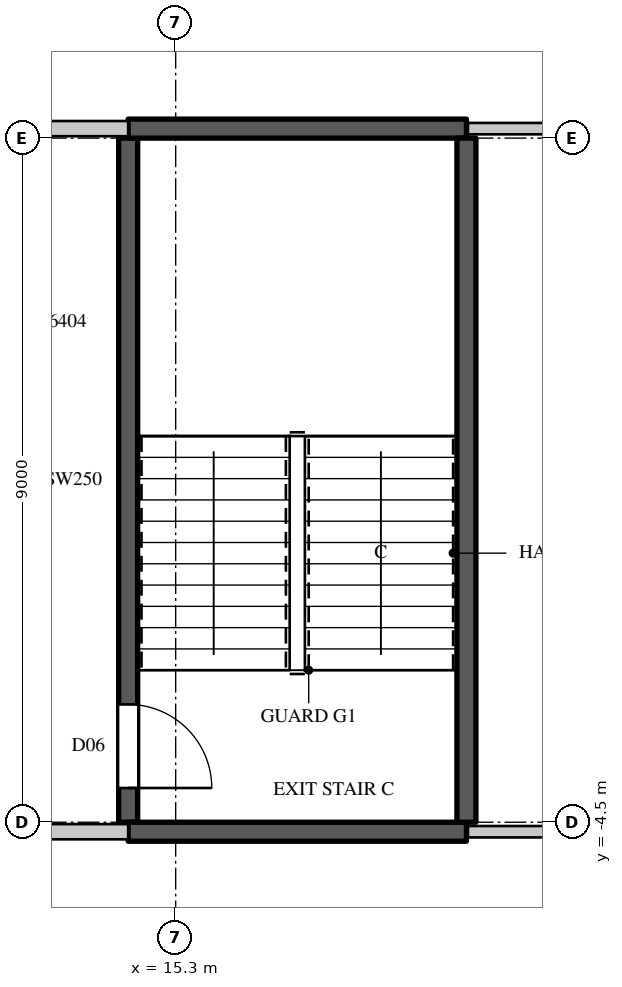
"""IFC4 building model, lengths in metres.
Left out: names, types, materials, properties, quantities, classifications, styles, units other than length and angle.
Written with IfcOpenShell. Run it as: python <this file> out.ifc"""

import sys

from ifc_helpers import new_model, si_unit, direction, frame, frame_2d, origin, place, context, subcontext, project, spatial, rectangle, extrude, element, fill, save


model = new_model("IFC4")
c1 = context("Model", 3, precision=1e-05, world=origin(), true_north=direction((0.0, 1.0)))
c2 = subcontext(c1, "Body", "Model", "MODEL_VIEW")
j1 = project(units=[si_unit("LENGTHUNIT", "METRE"), si_unit("PLANEANGLEUNIT", "RADIAN")], contexts=[c1])
p1 = place(None, origin())
s1 = spatial("IfcSite", under=j1, at=p1, CompositionType="ELEMENT")
p2 = place(p1, origin())
s2 = spatial("IfcBuilding", under=s1, at=p2, CompositionType="ELEMENT")
p3 = place(p2, frame((0.0, 0.0, 284.4)))
s3 = spatial("IfcBuildingStorey", under=s2, at=p3, CompositionType="ELEMENT", Elevation=284.4)
for number, where, z_axis, x_axis in (
    (1, (11.1, -4.625, 0.0), (0.0, 0.0, 1.0), (1.0, 0.0, 0.0)),
    (2, (11.1, 4.625, 0.0), (0.0, 0.0, 1.0), (1.0, 0.0, 0.0)),
):
    element("IfcWall", number, at=place(p3, frame(where, z_axis=z_axis, x_axis=x_axis)), inside=s3, PredefinedType="PARTITIONING", context=c2, shape_type="SweptSolid", body=[
        extrude(rectangle(XDim=3.575, YDim=0.2, at=frame_2d((1.788, 0.0))), origin(), (0.0, 0.0, 1.0), 3.8),
    ])
for number, where, z_axis, x_axis in (
    (3, (19.145, -4.625, 0.0), (0.0, 0.0, 1.0), (1.0, 0.0, 0.0)),
    (4, (19.145, 4.625, 0.0), (0.0, 0.0, 1.0), (1.0, 0.0, 0.0)),
):
    element("IfcWall", number, at=place(p3, frame(where, z_axis=z_axis, x_axis=x_axis)), inside=s3, PredefinedType="PARTITIONING", context=c2, shape_type="SweptSolid", body=[
        extrude(rectangle(XDim=4.605, YDim=0.15, at=frame_2d((2.302, 0.0))), origin(), (0.0, 0.0, 1.0), 3.8),
    ])
p4 = place(p3, frame((14.675, -4.5, 0.0), z_axis=(0.0, 0.0, 1.0), x_axis=(0.0, 1.0, 0.0)))
e5 = element("IfcWall", 5, at=p4, inside=s3, PredefinedType="SHEAR", context=c2, shape_type="SweptSolid", body=[
    extrude(rectangle(XDim=9.0, YDim=0.25, at=frame_2d((4.5, 0.0))), origin(), (0.0, 0.0, 1.0), 3.8),
])
p5 = place(p4, frame((0.45, 0.0, 0.0)))
e6 = element("IfcOpeningElement", 6, at=p5, cuts=e5, PredefinedType="OPENING", context=c2, shape_type="SweptSolid", body=[
    extrude(rectangle(XDim=1.1, YDim=2.2, at=frame_2d((0.55, 1.1))), frame((0.0, 0.135, 0.0), z_axis=(0.0, -1.0, 0.0), x_axis=(1.0, 0.0, 0.0)), (0.0, 0.0, 1.0), 0.27),
])
for number, where, z_axis, x_axis in (
    (7, (14.675, -4.625, 0.0), (0.0, 0.0, 1.0), (1.0, 0.0, 0.0)),
    (8, (14.675, 4.625, 0.0), (0.0, 0.0, 1.0), (1.0, 0.0, 0.0)),
):
    element("IfcWall", number, at=place(p3, frame(where, z_axis=z_axis, x_axis=x_axis)), inside=s3, PredefinedType="SHEAR", context=c2, shape_type="SweptSolid", body=[
        extrude(rectangle(XDim=4.45, YDim=0.25, at=frame_2d((2.225, 0.0))), origin(), (0.0, 0.0, 1.0), 3.8),
    ])
p6 = place(p3, frame((19.125, -4.5, 0.0), z_axis=(0.0, 0.0, 1.0), x_axis=(0.0, 1.0, 0.0)))
e9 = element("IfcWall", 9, at=p6, inside=s3, PredefinedType="SHEAR", context=c2, shape_type="SweptSolid", body=[
    extrude(rectangle(XDim=9.0, YDim=0.25, at=frame_2d((4.5, 0.0))), origin(), (0.0, 0.0, 1.0), 3.8),
])
p7 = place(p5, origin())
e10 = element("IfcDoor", 10, at=p7, inside=s3, OperationType="SINGLE_SWING_RIGHT", PredefinedType="DOOR", context=c2, shape_type="SweptSolid", body=[
    extrude(rectangle(XDim=1.1, YDim=2.2, at=frame_2d((0.55, 1.1))), frame((0.0, 0.025, 0.0), z_axis=(0.0, -1.0, 0.0), x_axis=(1.0, 0.0, 0.0)), (0.0, 0.0, 1.0), 0.05),
])
fill(e6, e10)
save(model, sys.argv[1])
